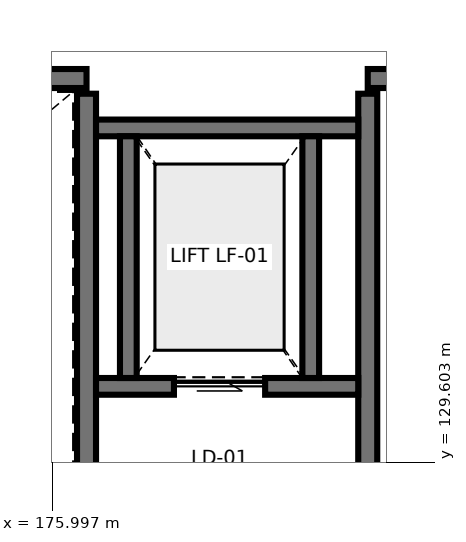
"""IFC4 building model, lengths in metres.
Left out: names, types, materials, properties, quantities, classifications, styles, units other than length and angle.
Written with IfcOpenShell. Run it as: python <this file> out.ifc"""

import sys

from ifc_helpers import new_model, si_unit, direction, frame, frame_2d, origin, place, context, subcontext, project, spatial, rectangle, extrude, element, fill, save


model = new_model("IFC4")
c1 = context("Model", 3, precision=1e-05, world=origin(), true_north=direction((0.0, 1.0)))
c2 = subcontext(c1, "Body", "Model", "MODEL_VIEW")
j1 = project(units=[si_unit("LENGTHUNIT", "METRE"), si_unit("PLANEANGLEUNIT", "RADIAN")], contexts=[c1])
p1 = place(None, origin())
s1 = spatial("IfcSite", under=j1, at=p1, CompositionType="ELEMENT")
p2 = place(p1, origin())
s2 = spatial("IfcBuilding", under=s1, at=p2, CompositionType="ELEMENT")
p3 = place(p2, frame((0.0, 0.0, 23.7)))
s3 = spatial("IfcBuildingStorey", under=s2, at=p3, CompositionType="ELEMENT", Elevation=23.7)
p4 = place(p3, frame((168.15, 134.65, 0.0), z_axis=(0.0, 0.0, 1.0), x_axis=(1.0, 0.0, 0.0)))
e1 = element("IfcWall", 1, at=p4, inside=s3, PredefinedType="SHEAR", context=c2, shape_type="SweptSolid", body=[
    extrude(rectangle(XDim=8.3, YDim=0.25, at=frame_2d((4.15, 0.0))), origin(), (0.0, 0.0, 1.0), 3.94),
])
p5 = place(p3, frame((176.45, 134.45, 0.0), z_axis=(0.0, 0.0, 1.0), x_axis=(0.0, -1.0, 0.0)))
e2 = element("IfcWall", 2, at=p5, inside=s3, PredefinedType="SHEAR", context=c2, shape_type="SweptSolid", body=[
    extrude(rectangle(XDim=5.3, YDim=0.25, at=frame_2d((2.65, 0.0))), origin(), (0.0, 0.0, 1.0), 3.94),
])
p6 = place(p3, frame((180.15, 134.65, 0.0), z_axis=(0.0, 0.0, 1.0), x_axis=(1.0, 0.0, 0.0)))
e3 = element("IfcWall", 3, at=p6, inside=s3, PredefinedType="SHEAR", context=c2, shape_type="SweptSolid", body=[
    extrude(rectangle(XDim=8.3, YDim=0.25, at=frame_2d((4.15, 0.0))), origin(), (0.0, 0.0, 1.0), 3.94),
])
p7 = place(p3, frame((180.15, 129.15, 0.0), z_axis=(0.0, 0.0, 1.0), x_axis=(0.0, 1.0, 0.0)))
e4 = element("IfcWall", 4, at=p7, inside=s3, PredefinedType="SHEAR", context=c2, shape_type="SweptSolid", body=[
    extrude(rectangle(XDim=5.3, YDim=0.25, at=frame_2d((2.65, 0.0))), origin(), (0.0, 0.0, 1.0), 3.94),
])
p8 = place(p3, frame((176.575, 130.6, 0.0), z_axis=(0.0, 0.0, 1.0), x_axis=(1.0, 0.0, 0.0)))
e5 = element("IfcWall", 5, at=p8, inside=s3, PredefinedType="SHEAR", context=c2, shape_type="SweptSolid", body=[
    extrude(rectangle(XDim=3.45, YDim=0.22, at=frame_2d((1.725, 0.0))), origin(), (0.0, 0.0, 1.0), 3.94),
])
p9 = place(p8, frame((1.025, 0.0, 0.0)))
e6 = element("IfcOpeningElement", 6, at=p9, cuts=e5, PredefinedType="OPENING", context=c2, shape_type="SweptSolid", body=[
    extrude(rectangle(XDim=1.2, YDim=2.25, at=frame_2d((0.6, 1.125))), frame((0.0, 0.12, 0.0), z_axis=(0.0, -1.0, 0.0), x_axis=(1.0, 0.0, 0.0)), (0.0, 0.0, 1.0), 0.24),
])
p10 = place(p3, frame((176.575, 134.0, 0.0), z_axis=(0.0, 0.0, 1.0), x_axis=(1.0, 0.0, 0.0)))
e7 = element("IfcWall", 7, at=p10, inside=s3, PredefinedType="SHEAR", context=c2, shape_type="SweptSolid", body=[
    extrude(rectangle(XDim=3.45, YDim=0.22, at=frame_2d((1.725, 0.0))), origin(), (0.0, 0.0, 1.0), 3.94),
])
for number, where, z_axis, x_axis in (
    (8, (177.0, 130.71, 0.0), (0.0, 0.0, 1.0), (0.0, 1.0, 0.0)),
    (9, (179.4, 130.71, 0.0), (0.0, 0.0, 1.0), (0.0, 1.0, 0.0)),
):
    element("IfcWall", number, at=place(p3, frame(where, z_axis=z_axis, x_axis=x_axis)), inside=s3, PredefinedType="SHEAR", context=c2, shape_type="SweptSolid", body=[
        extrude(rectangle(XDim=3.18, YDim=0.22, at=frame_2d((1.59, 0.0))), origin(), (0.0, 0.0, 1.0), 3.94),
    ])
p11 = place(p9, origin())
e10 = element("IfcDoor", 10, at=p11, inside=s3, OperationType="SLIDING_TO_LEFT", PredefinedType="DOOR", context=c2, shape_type="SweptSolid", body=[
    extrude(rectangle(XDim=1.2, YDim=2.25, at=frame_2d((0.6, 1.125))), frame((0.0, 0.025, 0.0), z_axis=(0.0, -1.0, 0.0), x_axis=(1.0, 0.0, 0.0)), (0.0, 0.0, 1.0), 0.05),
])
fill(e6, e10)
save(model, sys.argv[1])
